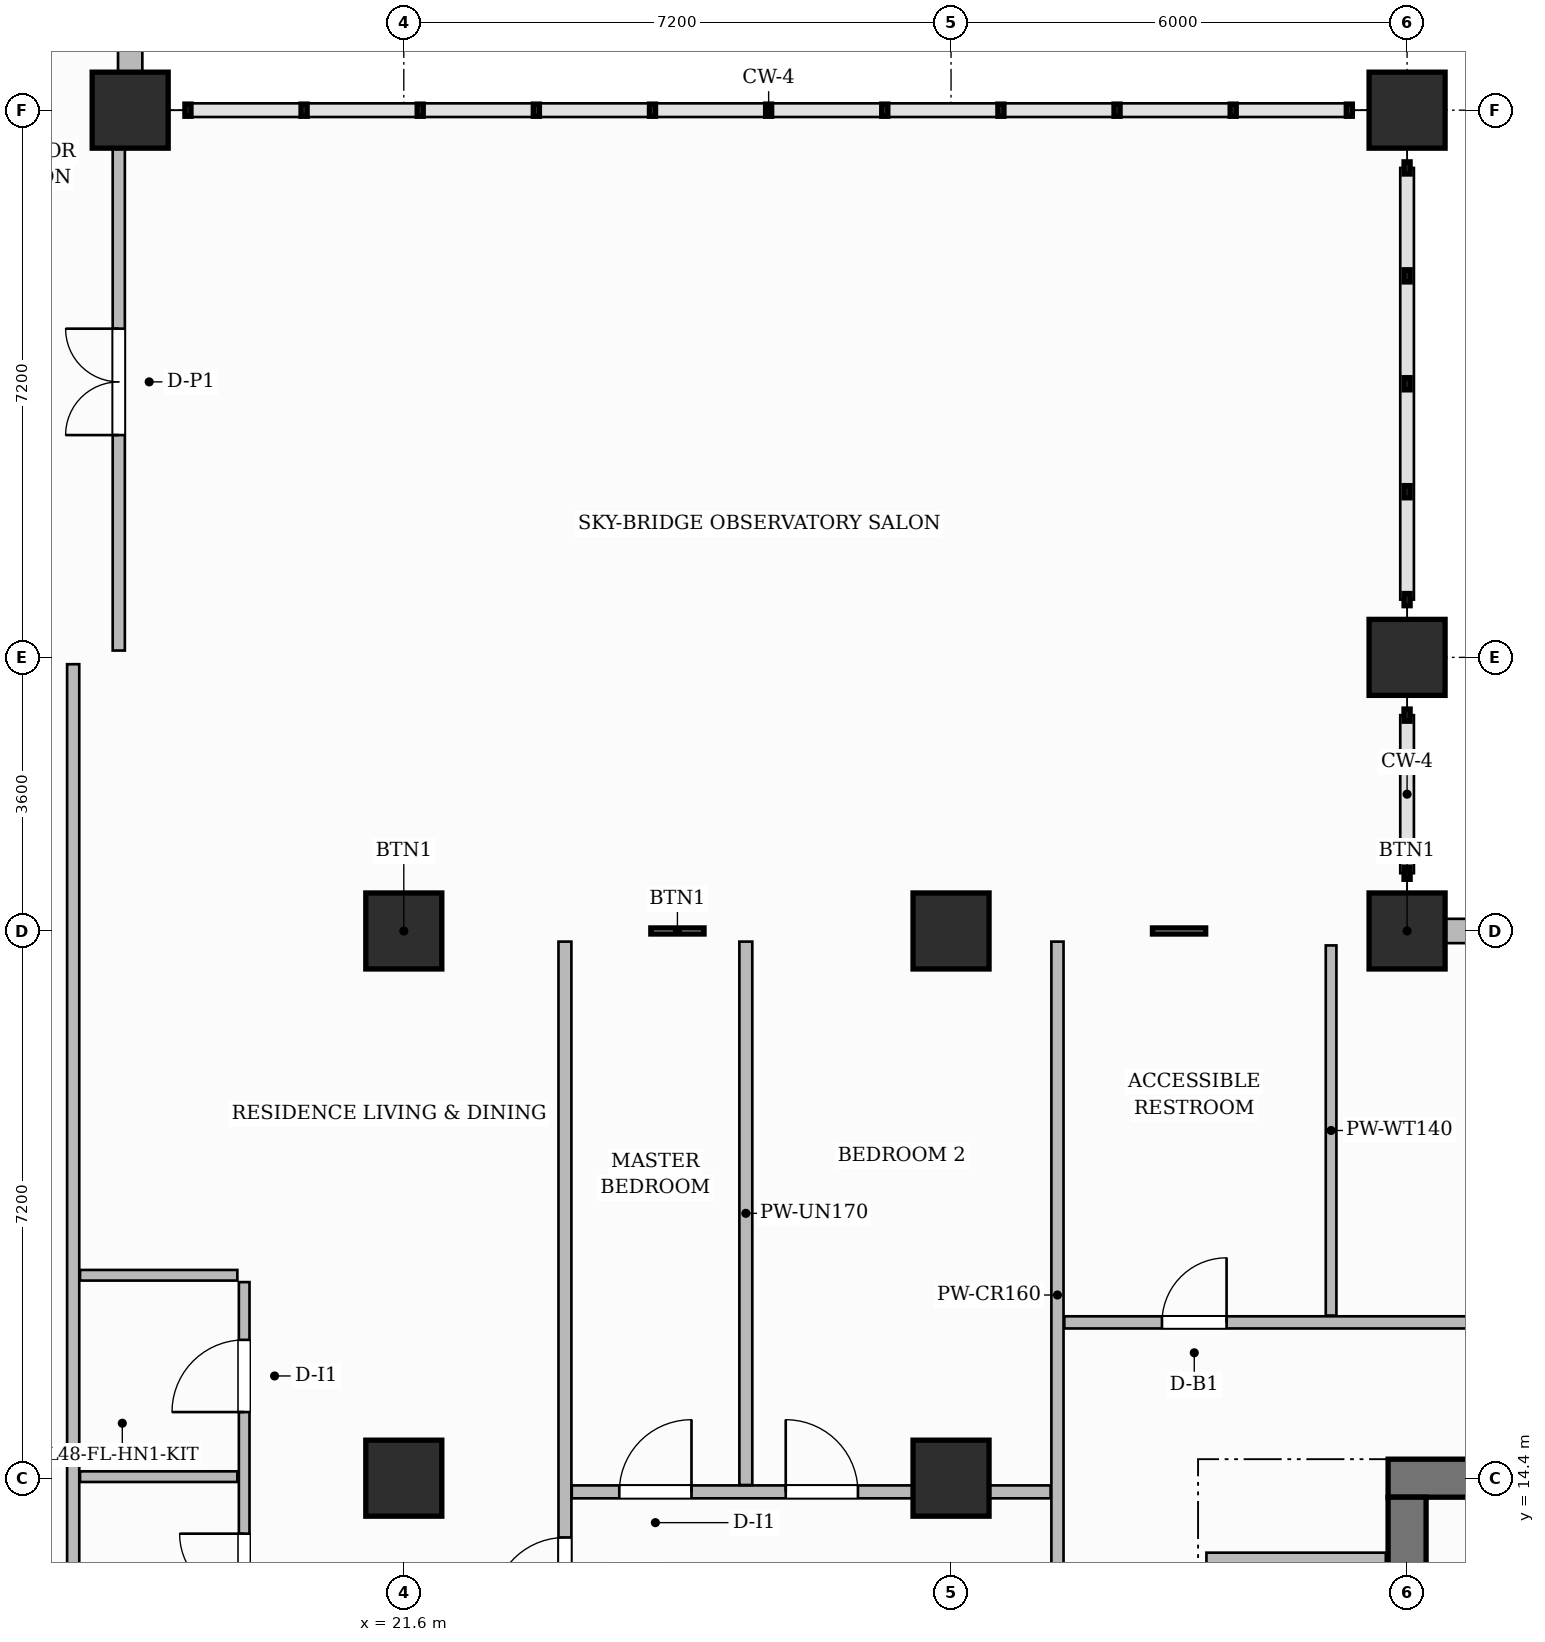
"""IFC4 building model, lengths in metres.
Left out: names, types, materials, properties, quantities, classifications, styles, units other than length and angle.
Written with IfcOpenShell. Run it as: python <this file> out.ifc"""

import sys

from ifc_helpers import new_model, si_unit, direction, frame, frame_2d, origin, origin_2d, place, context, subcontext, project, spatial, rectangle, extrude, source, transform, mapped, element, fill, save


model = new_model("IFC4")
c1 = context("Model", 3, precision=1e-05, world=origin(), true_north=direction((0.0, 1.0)))
c2 = subcontext(c1, "Body", "Model", "MODEL_VIEW")
j1 = project(units=[si_unit("LENGTHUNIT", "METRE"), si_unit("PLANEANGLEUNIT", "RADIAN")], contexts=[c1])
p1 = place(None, origin())
s1 = spatial("IfcSite", under=j1, at=p1, CompositionType="ELEMENT")
p2 = place(p1, origin())
s2 = spatial("IfcBuilding", under=s1, at=p2, CompositionType="ELEMENT")
p3 = place(p2, frame((0.0, 0.0, 192.65)))
s3 = spatial("IfcBuildingStorey", under=s2, at=p3, CompositionType="ELEMENT", Elevation=192.65)
p4 = place(p3, frame((34.55, 14.4, 0.0), z_axis=(0.0, 0.0, 1.0), x_axis=(1.0, 0.0, 0.0)))
e1 = element("IfcWall", 1, at=p4, inside=s3, PredefinedType="SHEAR", context=c2, shape_type="SweptSolid", body=[
    extrude(rectangle(XDim=15.5, YDim=0.5, at=frame_2d((7.75, 0.0))), origin(), (0.0, 0.0, 1.0), 3.85),
])
p5 = place(p4, frame((5.38, 0.0, 0.0)))
e2 = element("IfcOpeningElement", 2, at=p5, cuts=e1, PredefinedType="OPENING", context=c2, shape_type="SweptSolid", body=[
    extrude(rectangle(XDim=1.5, YDim=2.2, at=frame_2d((0.75, 1.1))), frame((0.0, 0.26, 0.0), z_axis=(0.0, -1.0, 0.0), x_axis=(1.0, 0.0, 0.0)), (0.0, 0.0, 1.0), 0.52),
])
p6 = place(p4, frame((1.595, 0.0, 0.0)))
e3 = element("IfcOpeningElement", 3, at=p6, cuts=e1, PredefinedType="OPENING", context=c2, shape_type="SweptSolid", body=[
    extrude(rectangle(XDim=1.05, YDim=2.15, at=frame_2d((0.525, 1.075))), frame((0.0, 0.26, 0.0), z_axis=(0.0, -1.0, 0.0), x_axis=(1.0, 0.0, 0.0)), (0.0, 0.0, 1.0), 0.52),
])
p7 = place(p4, frame((11.225, 0.0, 0.0)))
e4 = element("IfcOpeningElement", 4, at=p7, cuts=e1, PredefinedType="OPENING", context=c2, shape_type="SweptSolid", body=[
    extrude(rectangle(XDim=1.05, YDim=2.15, at=frame_2d((0.525, 1.075))), frame((0.0, 0.26, 0.0), z_axis=(0.0, -1.0, 0.0), x_axis=(1.0, 0.0, 0.0)), (0.0, 0.0, 1.0), 0.52),
])
p8 = place(p3, frame((34.8, 3.85, 0.0), z_axis=(0.0, 0.0, 1.0), x_axis=(0.0, 1.0, 0.0)))
e5 = element("IfcWall", 5, at=p8, inside=s3, PredefinedType="SHEAR", context=c2, shape_type="SweptSolid", body=[
    extrude(rectangle(XDim=10.3, YDim=0.5, at=frame_2d((5.15, 0.0))), origin(), (0.0, 0.0, 1.0), 3.85),
])
m1 = source(origin(), c2, "Body", "SweptSolid", [
    extrude(rectangle(XDim=1.0, YDim=1.0, at=origin_2d()), origin(), (0.0, 0.0, 1.0), 3.85),
])
for number, where, z_axis, x_axis in (
    (6, (21.6, 14.4, 0.0), (0.0, 0.0, 1.0), (1.0, 0.0, 0.0)),
    (7, (21.6, 21.6, 0.0), (0.0, 0.0, 1.0), (1.0, 0.0, 0.0)),
    (8, (28.8, 14.4, 0.0), (0.0, 0.0, 1.0), (1.0, 0.0, 0.0)),
    (9, (28.8, 21.6, 0.0), (0.0, 0.0, 1.0), (1.0, 0.0, 0.0)),
    (10, (34.8, 21.6, 0.0), (0.0, 0.0, 1.0), (1.0, 0.0, 0.0)),
    (11, (34.8, 25.2, 0.0), (0.0, 0.0, 1.0), (1.0, 0.0, 0.0)),
    (12, (34.8, 32.4, 0.0), (0.0, 0.0, 1.0), (1.0, 0.0, 0.0)),
    (13, (18.0, 32.4, 0.0), (0.0, 0.0, 1.0), (1.0, 0.0, 0.0)),
):
    element("IfcColumn", number, at=place(p3, frame(where, z_axis=z_axis, x_axis=x_axis)), inside=s3, PredefinedType="COLUMN", context=c2, shape_type="MappedRepresentation", body=[
        mapped(m1, transform((0.0, 0.0, 0.0), scale=1.0)),
    ])
p9 = place(p3, frame((32.16, 13.32, 0.0), z_axis=(0.0, 0.0, 1.0), x_axis=(1.0, 0.0, 0.0)))
e14 = element("IfcWall", 14, at=p9, inside=s3, PredefinedType="PARTITIONING", context=c2, shape_type="SweptSolid", body=[
    extrude(rectangle(XDim=2.36, YDim=0.2, at=frame_2d((1.18, 0.0))), origin(), (0.0, 0.0, 1.0), 3.55),
])
p10 = place(p3, frame((30.2, 12.16, 0.0), z_axis=(0.0, 0.0, 1.0), x_axis=(0.0, 1.0, 0.0)))
e15 = element("IfcWall", 15, at=p10, inside=s3, PredefinedType="PARTITIONING", context=c2, shape_type="SweptSolid", body=[
    extrude(rectangle(XDim=9.3, YDim=0.16, at=frame_2d((4.65, 0.0))), origin(), (0.0, 0.0, 1.0), 3.55),
])
p11 = place(p3, frame((30.29, 16.45, 0.0), z_axis=(0.0, 0.0, 1.0), x_axis=(1.0, 0.0, 0.0)))
e16 = element("IfcWall", 16, at=p11, inside=s3, PredefinedType="PARTITIONING", context=c2, shape_type="SweptSolid", body=[
    extrude(rectangle(XDim=19.37, YDim=0.16, at=frame_2d((9.685, 0.0))), origin(), (0.0, 0.0, 1.0), 3.55),
])
p12 = place(p11, frame((1.285, 0.0, 0.0)))
e17 = element("IfcOpeningElement", 17, at=p12, cuts=e16, PredefinedType="OPENING", context=c2, shape_type="SweptSolid", body=[
    extrude(rectangle(XDim=0.85, YDim=2.1, at=frame_2d((0.425, 1.05))), frame((0.0, 0.09, 0.0), z_axis=(0.0, -1.0, 0.0), x_axis=(1.0, 0.0, 0.0)), (0.0, 0.0, 1.0), 0.18),
])
p13 = place(p11, frame((10.66, 0.0, 0.0)))
e18 = element("IfcOpeningElement", 18, at=p13, cuts=e16, PredefinedType="OPENING", context=c2, shape_type="SweptSolid", body=[
    extrude(rectangle(XDim=1.6, YDim=2.4, at=frame_2d((0.8, 1.2))), frame((0.0, 0.09, 0.0), z_axis=(0.0, -1.0, 0.0), x_axis=(1.0, 0.0, 0.0)), (0.0, 0.0, 1.0), 0.18),
])
p14 = place(p3, frame((33.8, 16.54, 0.0), z_axis=(0.0, 0.0, 1.0), x_axis=(0.0, 1.0, 0.0)))
e19 = element("IfcWall", 19, at=p14, inside=s3, PredefinedType="PARTITIONING", context=c2, shape_type="SweptSolid", body=[
    extrude(rectangle(XDim=4.87, YDim=0.14, at=frame_2d((2.435, 0.0))), origin(), (0.0, 0.0, 1.0), 3.55),
])
p15 = place(p3, frame((17.25, 12.16, 0.0), z_axis=(0.0, 0.0, 1.0), x_axis=(0.0, 1.0, 0.0)))
e20 = element("IfcWall", 20, at=p15, inside=s3, PredefinedType="PARTITIONING", context=c2, shape_type="SweptSolid", body=[
    extrude(rectangle(XDim=12.95, YDim=0.16, at=frame_2d((6.475, 0.0))), origin(), (0.0, 0.0, 1.0), 3.55),
])
p16 = place(p3, frame((19.5, 12.16, 0.0), z_axis=(0.0, 0.0, 1.0), x_axis=(0.0, 1.0, 0.0)))
e21 = element("IfcWall", 21, at=p16, inside=s3, PredefinedType="PARTITIONING", context=c2, shape_type="SweptSolid", body=[
    extrude(rectangle(XDim=4.82, YDim=0.14, at=frame_2d((2.41, 0.0))), origin(), (0.0, 0.0, 1.0), 3.55),
])
p17 = place(p16, frame((0.66, 0.0, 0.0)))
e22 = element("IfcOpeningElement", 22, at=p17, cuts=e21, PredefinedType="OPENING", context=c2, shape_type="SweptSolid", body=[
    extrude(rectangle(XDim=0.85, YDim=2.1, at=frame_2d((0.425, 1.05))), frame((0.0, 0.08, 0.0), z_axis=(0.0, -1.0, 0.0), x_axis=(1.0, 0.0, 0.0)), (0.0, 0.0, 1.0), 0.16),
])
p18 = place(p16, frame((3.11, 0.0, 0.0)))
e23 = element("IfcOpeningElement", 23, at=p18, cuts=e21, PredefinedType="OPENING", context=c2, shape_type="SweptSolid", body=[
    extrude(rectangle(XDim=0.95, YDim=2.15, at=frame_2d((0.475, 1.075))), frame((0.0, 0.08, 0.0), z_axis=(0.0, -1.0, 0.0), x_axis=(1.0, 0.0, 0.0)), (0.0, 0.0, 1.0), 0.16),
])
p19 = place(p3, frame((17.34, 14.42, 0.0), z_axis=(0.0, 0.0, 1.0), x_axis=(1.0, 0.0, 0.0)))
e24 = element("IfcWall", 24, at=p19, inside=s3, PredefinedType="PARTITIONING", context=c2, shape_type="SweptSolid", body=[
    extrude(rectangle(XDim=2.07, YDim=0.14, at=frame_2d((1.035, 0.0))), origin(), (0.0, 0.0, 1.0), 3.035),
])
p20 = place(p3, frame((17.34, 17.07, 0.0), z_axis=(0.0, 0.0, 1.0), x_axis=(1.0, 0.0, 0.0)))
e25 = element("IfcWall", 25, at=p20, inside=s3, PredefinedType="PARTITIONING", context=c2, shape_type="SweptSolid", body=[
    extrude(rectangle(XDim=2.07, YDim=0.14, at=frame_2d((1.035, 0.0))), origin(), (0.0, 0.0, 1.0), 3.55),
])
p21 = place(p3, frame((23.72, 12.16, 0.0), z_axis=(0.0, 0.0, 1.0), x_axis=(0.0, 1.0, 0.0)))
e26 = element("IfcWall", 26, at=p21, inside=s3, PredefinedType="PARTITIONING", context=c2, shape_type="SweptSolid", body=[
    extrude(rectangle(XDim=9.3, YDim=0.17, at=frame_2d((4.65, 0.0))), origin(), (0.0, 0.0, 1.0), 3.55),
])
p22 = place(p21, frame((0.51, 0.0, 0.0)))
e27 = element("IfcOpeningElement", 27, at=p22, cuts=e26, PredefinedType="OPENING", context=c2, shape_type="SweptSolid", body=[
    extrude(rectangle(XDim=0.95, YDim=2.15, at=frame_2d((0.475, 1.075))), frame((0.0, 0.095, 0.0), z_axis=(0.0, -1.0, 0.0), x_axis=(1.0, 0.0, 0.0)), (0.0, 0.0, 1.0), 0.19),
])
p23 = place(p3, frame((23.81, 14.22, 0.0), z_axis=(0.0, 0.0, 1.0), x_axis=(1.0, 0.0, 0.0)))
e28 = element("IfcWall", 28, at=p23, inside=s3, PredefinedType="PARTITIONING", context=c2, shape_type="SweptSolid", body=[
    extrude(rectangle(XDim=6.3, YDim=0.17, at=frame_2d((3.15, 0.0))), origin(), (0.0, 0.0, 1.0), 2.935),
])
p24 = place(p23, frame((0.625, 0.0, 0.0)))
e29 = element("IfcOpeningElement", 29, at=p24, cuts=e28, PredefinedType="OPENING", context=c2, shape_type="SweptSolid", body=[
    extrude(rectangle(XDim=0.95, YDim=2.15, at=frame_2d((0.475, 1.075))), frame((0.0, 0.095, 0.0), z_axis=(0.0, -1.0, 0.0), x_axis=(1.0, 0.0, 0.0)), (0.0, 0.0, 1.0), 0.19),
])
p25 = place(p23, frame((2.815, 0.0, 0.0)))
e30 = element("IfcOpeningElement", 30, at=p25, cuts=e28, PredefinedType="OPENING", context=c2, shape_type="SweptSolid", body=[
    extrude(rectangle(XDim=0.95, YDim=2.15, at=frame_2d((0.475, 1.075))), frame((0.0, 0.095, 0.0), z_axis=(0.0, -1.0, 0.0), x_axis=(1.0, 0.0, 0.0)), (0.0, 0.0, 1.0), 0.19),
])
p26 = place(p3, frame((26.1, 14.31, 0.0), z_axis=(0.0, 0.0, 1.0), x_axis=(0.0, 1.0, 0.0)))
e31 = element("IfcWall", 31, at=p26, inside=s3, PredefinedType="PARTITIONING", context=c2, shape_type="SweptSolid", body=[
    extrude(rectangle(XDim=7.15, YDim=0.17, at=frame_2d((3.575, 0.0))), origin(), (0.0, 0.0, 1.0), 3.55),
])
p27 = place(p3, frame((17.85, 25.29, 0.0), z_axis=(0.0, 0.0, 1.0), x_axis=(0.0, 1.0, 0.0)))
e32 = element("IfcWall", 32, at=p27, inside=s3, PredefinedType="PARTITIONING", context=c2, shape_type="SweptSolid", body=[
    extrude(rectangle(XDim=6.92, YDim=0.16, at=frame_2d((3.46, 0.0))), origin(), (0.0, 0.0, 1.0), 3.55),
])
p28 = place(p27, frame((2.835, 0.0, 0.0)))
e33 = element("IfcOpeningElement", 33, at=p28, cuts=e32, PredefinedType="OPENING", context=c2, shape_type="SweptSolid", body=[
    extrude(rectangle(XDim=1.4, YDim=2.35, at=frame_2d((0.7, 1.175))), frame((0.0, 0.09, 0.0), z_axis=(0.0, -1.0, 0.0), x_axis=(1.0, 0.0, 0.0)), (0.0, 0.0, 1.0), 0.18),
])
p29 = place(p3, frame((34.8, 21.6, 0.0), z_axis=(0.0, 0.0, 1.0), x_axis=(1.0, 0.0, 0.0)))
e34 = element("IfcWall", 34, at=p29, inside=s3, PredefinedType="SOLIDWALL", context=c2, shape_type="SweptSolid", body=[
    extrude(rectangle(XDim=15.0, YDim=0.32, at=frame_2d((7.5, 0.0))), origin(), (0.0, 0.0, 1.0), 3.035),
])
p30 = place(p29, frame((1.325, 0.0, 0.8)))
e35 = element("IfcOpeningElement", 35, at=p30, cuts=e34, PredefinedType="OPENING", context=c2, shape_type="SweptSolid", body=[
    extrude(rectangle(XDim=1.8, YDim=1.85, at=frame_2d((0.9, 0.925))), frame((0.0, 0.17, 0.0), z_axis=(0.0, -1.0, 0.0), x_axis=(1.0, 0.0, 0.0)), (0.0, 0.0, 1.0), 0.34),
])
p31 = place(p29, frame((4.075, 0.0, 0.8)))
e36 = element("IfcOpeningElement", 36, at=p31, cuts=e34, PredefinedType="OPENING", context=c2, shape_type="SweptSolid", body=[
    extrude(rectangle(XDim=1.8, YDim=1.85, at=frame_2d((0.9, 0.925))), frame((0.0, 0.17, 0.0), z_axis=(0.0, -1.0, 0.0), x_axis=(1.0, 0.0, 0.0)), (0.0, 0.0, 1.0), 0.34),
])
p32 = place(p29, frame((8.675, 0.0, 0.8)))
e37 = element("IfcOpeningElement", 37, at=p32, cuts=e34, PredefinedType="OPENING", context=c2, shape_type="SweptSolid", body=[
    extrude(rectangle(XDim=1.8, YDim=1.85, at=frame_2d((0.9, 0.925))), frame((0.0, 0.17, 0.0), z_axis=(0.0, -1.0, 0.0), x_axis=(1.0, 0.0, 0.0)), (0.0, 0.0, 1.0), 0.34),
])
p33 = place(p29, frame((11.725, 0.0, 0.8)))
e38 = element("IfcOpeningElement", 38, at=p33, cuts=e34, PredefinedType="OPENING", context=c2, shape_type="SweptSolid", body=[
    extrude(rectangle(XDim=1.8, YDim=1.85, at=frame_2d((0.9, 0.925))), frame((0.0, 0.17, 0.0), z_axis=(0.0, -1.0, 0.0), x_axis=(1.0, 0.0, 0.0)), (0.0, 0.0, 1.0), 0.34),
])
p34 = place(p3, frame((18.0, 32.4, 0.0), z_axis=(0.0, 0.0, 1.0), x_axis=(0.0, 1.0, 0.0)))
e39 = element("IfcWall", 39, at=p34, inside=s3, PredefinedType="SOLIDWALL", context=c2, shape_type="SweptSolid", body=[
    extrude(rectangle(XDim=14.35, YDim=0.32, at=frame_2d((7.175, 0.0))), origin(), (0.0, 0.0, 1.0), 3.55),
])
p35 = place(p34, frame((0.85, 0.0, 0.0)))
e40 = element("IfcOpeningElement", 40, at=p35, cuts=e39, PredefinedType="OPENING", context=c2, shape_type="SweptSolid", body=[
    extrude(rectangle(XDim=1.2, YDim=2.2, at=frame_2d((0.6, 1.1))), frame((0.0, 0.17, 0.0), z_axis=(0.0, -1.0, 0.0), x_axis=(1.0, 0.0, 0.0)), (0.0, 0.0, 1.0), 0.34),
])
p36 = place(p34, frame((3.475, 0.0, 0.8)))
e41 = element("IfcOpeningElement", 41, at=p36, cuts=e39, PredefinedType="OPENING", context=c2, shape_type="SweptSolid", body=[
    extrude(rectangle(XDim=1.8, YDim=1.85, at=frame_2d((0.9, 0.925))), frame((0.0, 0.17, 0.0), z_axis=(0.0, -1.0, 0.0), x_axis=(1.0, 0.0, 0.0)), (0.0, 0.0, 1.0), 0.34),
])
p37 = place(p34, frame((8.525, 0.0, 0.8)))
e42 = element("IfcOpeningElement", 42, at=p37, cuts=e39, PredefinedType="OPENING", context=c2, shape_type="SweptSolid", body=[
    extrude(rectangle(XDim=1.8, YDim=1.85, at=frame_2d((0.9, 0.925))), frame((0.0, 0.17, 0.0), z_axis=(0.0, -1.0, 0.0), x_axis=(1.0, 0.0, 0.0)), (0.0, 0.0, 1.0), 0.34),
])
p38 = place(p34, frame((11.275, 0.0, 0.8)))
e43 = element("IfcOpeningElement", 43, at=p38, cuts=e39, PredefinedType="OPENING", context=c2, shape_type="SweptSolid", body=[
    extrude(rectangle(XDim=1.8, YDim=1.85, at=frame_2d((0.9, 0.925))), frame((0.0, 0.17, 0.0), z_axis=(0.0, -1.0, 0.0), x_axis=(1.0, 0.0, 0.0)), (0.0, 0.0, 1.0), 0.34),
])
m2 = source(origin(), c2, "Body", "SweptSolid", [
    extrude(rectangle(XDim=0.85, YDim=2.1, at=frame_2d((0.425, 1.05))), frame((0.0, 0.025, 0.0), z_axis=(0.0, -1.0, 0.0), x_axis=(1.0, 0.0, 0.0)), (0.0, 0.0, 1.0), 0.05),
])
p39 = place(p12, origin())
e44 = element("IfcDoor", 44, at=p39, inside=s3, OperationType="SINGLE_SWING_RIGHT", PredefinedType="DOOR", context=c2, shape_type="MappedRepresentation", body=[
    mapped(m2, transform((0.0, 0.0, 0.0), scale=1.0)),
])
fill(e17, e44)
p40 = place(p17, origin())
e45 = element("IfcDoor", 45, at=p40, inside=s3, OperationType="SINGLE_SWING_RIGHT", PredefinedType="DOOR", context=c2, shape_type="MappedRepresentation", body=[
    mapped(m2, transform((0.0, 0.0, 0.0), scale=1.0)),
])
fill(e22, e45)
m3 = source(origin(), c2, "Body", "SweptSolid", [
    extrude(rectangle(XDim=0.95, YDim=2.15, at=frame_2d((0.475, 1.075))), frame((0.0, 0.025, 0.0), z_axis=(0.0, -1.0, 0.0), x_axis=(1.0, 0.0, 0.0)), (0.0, 0.0, 1.0), 0.05),
])
p41 = place(p18, origin())
e46 = element("IfcDoor", 46, at=p41, inside=s3, OperationType="SINGLE_SWING_LEFT", PredefinedType="DOOR", context=c2, shape_type="MappedRepresentation", body=[
    mapped(m3, transform((0.0, 0.0, 0.0), scale=1.0)),
])
fill(e23, e46)
p42 = place(p22, origin())
e47 = element("IfcDoor", 47, at=p42, inside=s3, OperationType="SINGLE_SWING_LEFT", PredefinedType="DOOR", context=c2, shape_type="MappedRepresentation", body=[
    mapped(m3, transform((0.0, 0.0, 0.0), scale=1.0)),
])
fill(e27, e47)
p43 = place(p24, origin())
e48 = element("IfcDoor", 48, at=p43, inside=s3, OperationType="SINGLE_SWING_RIGHT", PredefinedType="DOOR", context=c2, shape_type="MappedRepresentation", body=[
    mapped(m3, transform((0.0, 0.0, 0.0), scale=1.0)),
])
fill(e29, e48)
p44 = place(p25, origin())
e49 = element("IfcDoor", 49, at=p44, inside=s3, OperationType="SINGLE_SWING_LEFT", PredefinedType="DOOR", context=c2, shape_type="MappedRepresentation", body=[
    mapped(m3, transform((0.0, 0.0, 0.0), scale=1.0)),
])
fill(e30, e49)
m4 = source(origin(), c2, "Body", "SweptSolid", [
    extrude(rectangle(XDim=1.4, YDim=2.35, at=frame_2d((0.7, 1.175))), frame((0.0, 0.025, 0.0), z_axis=(0.0, -1.0, 0.0), x_axis=(1.0, 0.0, 0.0)), (0.0, 0.0, 1.0), 0.05),
])
p45 = place(p28, origin())
e50 = element("IfcDoor", 50, at=p45, inside=s3, OperationType="DOUBLE_DOOR_SINGLE_SWING", PredefinedType="DOOR", context=c2, shape_type="MappedRepresentation", body=[
    mapped(m4, transform((0.0, 0.0, 0.0), scale=1.0)),
])
fill(e33, e50)
save(model, sys.argv[1])
